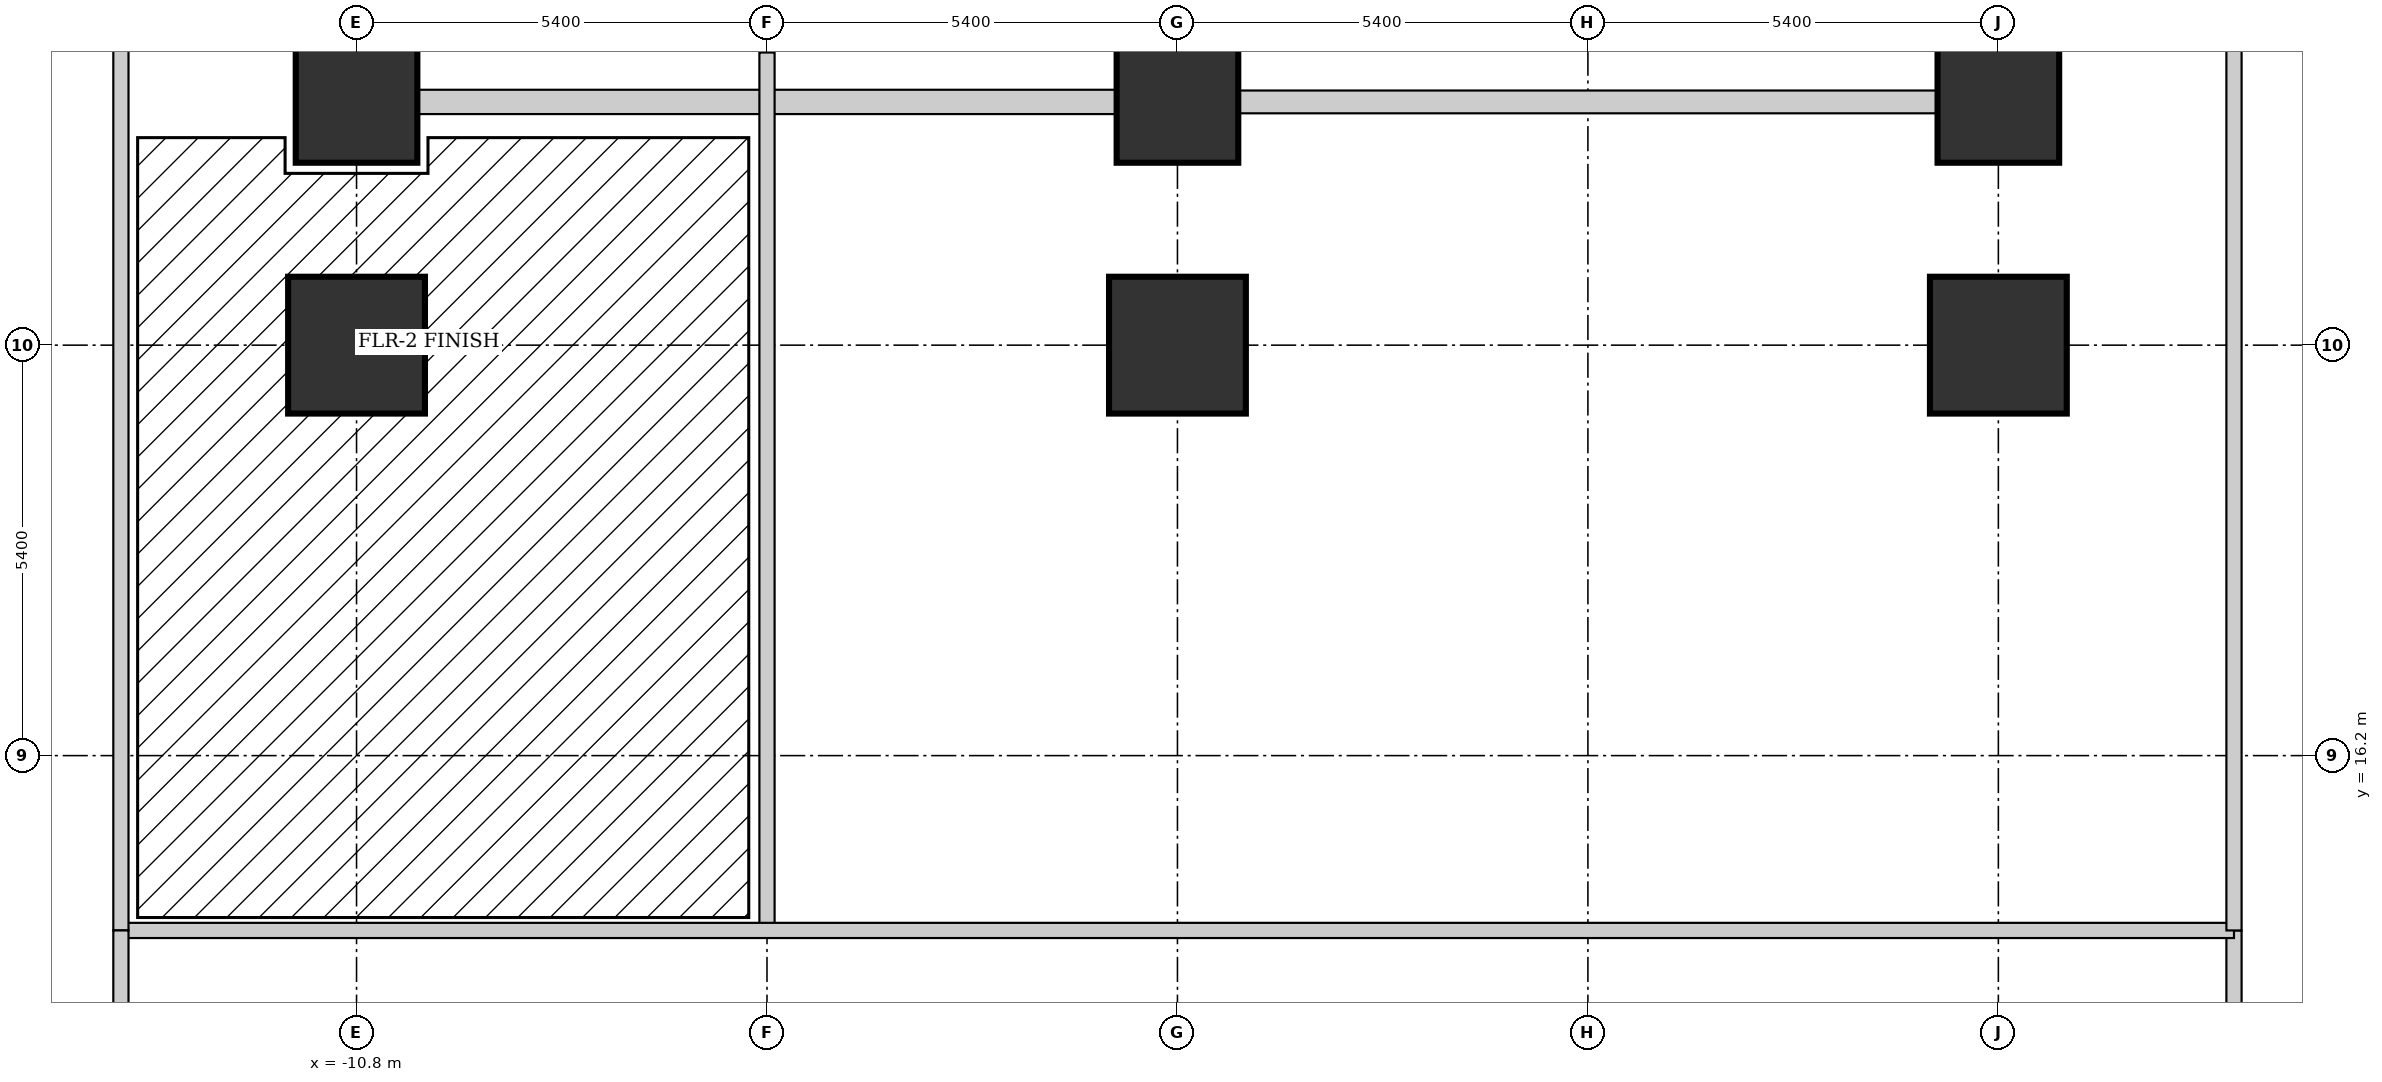
"""IFC4 building model, lengths in metres.
Left out: names, types, materials, properties, quantities, classifications, styles, units other than length and angle.
Written with IfcOpenShell. Run it as: python <this file> out.ifc"""

import sys

from ifc_helpers import new_model, si_unit, direction, frame, frame_2d, origin, origin_2d, place, context, subcontext, project, spatial, rectangle, circle, extrude, element, fill, save


model = new_model("IFC4")
c1 = context("Model", 3, precision=1e-05, world=origin(), true_north=direction((0.0, 1.0)))
c2 = subcontext(c1, "Body", "Model", "MODEL_VIEW")
j1 = project(units=[si_unit("LENGTHUNIT", "METRE"), si_unit("PLANEANGLEUNIT", "RADIAN")], contexts=[c1])
p1 = place(None, origin())
s1 = spatial("IfcSite", under=j1, at=p1, CompositionType="ELEMENT")
p2 = place(p1, origin())
s2 = spatial("IfcBuilding", under=s1, at=p2, CompositionType="ELEMENT")
p3 = place(p2, frame((0.0, 0.0, 9.0)))
s3 = spatial("IfcBuildingStorey", under=s2, at=p3, CompositionType="ELEMENT", Elevation=9.0)
p4 = place(p3, frame((-10.8, 21.6, 0.0), z_axis=(0.0, 0.0, 1.0), x_axis=(1.0, 0.0, 0.0)))
e1 = element("IfcColumn", 1, at=p4, inside=s3, PredefinedType="COLUMN", context=c2, shape_type="SweptSolid", body=[
    extrude(circle(Radius=0.9, at=origin_2d()), origin(), (0.0, 0.0, 1.0), 4.5),
])
p5 = place(p3, frame((-10.8, 24.8, 0.0), z_axis=(0.0, 0.0, 1.0), x_axis=(1.0, 0.0, 0.0)))
e2 = element("IfcColumn", 2, at=p5, inside=s3, PredefinedType="COLUMN", context=c2, shape_type="SweptSolid", body=[
    extrude(rectangle(XDim=1.6, YDim=1.6, at=origin_2d()), origin(), (0.0, 0.0, 1.0), 4.5),
])
p6 = place(p3, frame((0.0, 21.6, 0.0), z_axis=(0.0, 0.0, 1.0), x_axis=(1.0, 0.0, 0.0)))
e3 = element("IfcColumn", 3, at=p6, inside=s3, PredefinedType="COLUMN", context=c2, shape_type="SweptSolid", body=[
    extrude(circle(Radius=0.9, at=origin_2d()), origin(), (0.0, 0.0, 1.0), 4.5),
])
p7 = place(p3, frame((0.0, 24.8, 0.0), z_axis=(0.0, 0.0, 1.0), x_axis=(1.0, 0.0, 0.0)))
e4 = element("IfcColumn", 4, at=p7, inside=s3, PredefinedType="COLUMN", context=c2, shape_type="SweptSolid", body=[
    extrude(rectangle(XDim=1.6, YDim=1.6, at=origin_2d()), origin(), (0.0, 0.0, 1.0), 4.5),
])
p8 = place(p3, frame((10.8, 21.6, 0.0), z_axis=(0.0, 0.0, 1.0), x_axis=(1.0, 0.0, 0.0)))
e5 = element("IfcColumn", 5, at=p8, inside=s3, PredefinedType="COLUMN", context=c2, shape_type="SweptSolid", body=[
    extrude(circle(Radius=0.9, at=origin_2d()), origin(), (0.0, 0.0, 1.0), 4.5),
])
p9 = place(p3, frame((10.8, 24.8, 0.0), z_axis=(0.0, 0.0, 1.0), x_axis=(1.0, 0.0, 0.0)))
e6 = element("IfcColumn", 6, at=p9, inside=s3, PredefinedType="COLUMN", context=c2, shape_type="SweptSolid", body=[
    extrude(rectangle(XDim=1.6, YDim=1.6, at=origin_2d()), origin(), (0.0, 0.0, 1.0), 4.5),
])
p10 = place(p3, frame((-10.002, 24.8, 0.0), z_axis=(0.0, 0.0, 1.0), x_axis=(1.0, 0.0, 0.0)))
e7 = element("IfcWall", 7, at=p10, inside=s3, PredefinedType="STANDARD", context=c2, shape_type="SweptSolid", body=[
    extrude(rectangle(XDim=9.204, YDim=0.32, at=frame_2d((4.602, 0.0))), origin(), (0.0, 0.0, 1.0), 3.379),
])
p11 = place(p3, frame((0.798, 24.8, 0.0), z_axis=(0.0, 0.0, 1.0), x_axis=(1.0, 0.0, 0.0)))
e8 = element("IfcWall", 8, at=p11, inside=s3, PredefinedType="STANDARD", context=c2, shape_type="SweptSolid", body=[
    extrude(rectangle(XDim=9.204, YDim=0.3, at=frame_2d((4.602, 0.0))), origin(), (0.0, 0.0, 1.0), 3.379),
])
p12 = place(p11, frame((3.702, 0.0, 0.85)))
e9 = element("IfcOpeningElement", 9, at=p12, cuts=e8, PredefinedType="OPENING", context=c2, shape_type="SweptSolid", body=[
    extrude(rectangle(XDim=1.8, YDim=1.75, at=frame_2d((0.9, 0.875))), frame((0.0, 0.16, 0.0), z_axis=(0.0, -1.0, 0.0), x_axis=(1.0, 0.0, 0.0)), (0.0, 0.0, 1.0), 0.32),
])
p13 = place(p3, frame((-5.4, 13.9, 0.0), z_axis=(0.0, 0.0, 1.0), x_axis=(0.0, 1.0, 0.0)))
e10 = element("IfcWall", 10, at=p13, inside=s3, PredefinedType="PARTITIONING", context=c2, shape_type="SweptSolid", body=[
    extrude(rectangle(XDim=11.55, YDim=0.2, at=frame_2d((5.775, 0.0))), origin(), (0.0, 0.0, 1.0), 3.379),
])
p14 = place(p3, frame((13.9, -11.45, 0.0), z_axis=(0.0, 0.0, 1.0), x_axis=(0.0, 1.0, 0.0)))
e11 = element("IfcWall", 11, at=p14, inside=s3, PredefinedType="PARTITIONING", context=c2, shape_type="SweptSolid", body=[
    extrude(rectangle(XDim=25.35, YDim=0.2, at=frame_2d((12.675, 0.0))), origin(), (0.0, 0.0, 1.0), 3.379),
])
p15 = place(p14, frame((10.0, 0.0, 0.0)))
e12 = element("IfcOpeningElement", 12, at=p15, cuts=e11, PredefinedType="OPENING", context=c2, shape_type="SweptSolid", body=[
    extrude(rectangle(XDim=1.1, YDim=2.1, at=frame_2d((0.55, 1.05))), frame((0.0, 0.11, 0.0), z_axis=(0.0, -1.0, 0.0), x_axis=(1.0, 0.0, 0.0)), (0.0, 0.0, 1.0), 0.22),
])
p16 = place(p3, frame((-13.9, 13.9, 0.0), z_axis=(0.0, 0.0, 1.0), x_axis=(1.0, 0.0, 0.0)))
e13 = element("IfcWall", 13, at=p16, inside=s3, PredefinedType="PARTITIONING", context=c2, shape_type="SweptSolid", body=[
    extrude(rectangle(XDim=27.8, YDim=0.2, at=frame_2d((13.9, 0.0))), origin(), (0.0, 0.0, 1.0), 3.379),
])
p17 = place(p16, frame((3.5, 0.0, 0.0)))
e14 = element("IfcOpeningElement", 14, at=p17, cuts=e13, PredefinedType="OPENING", context=c2, shape_type="SweptSolid", body=[
    extrude(rectangle(XDim=1.1, YDim=2.1, at=frame_2d((0.55, 1.05))), frame((0.0, 0.11, 0.0), z_axis=(0.0, -1.0, 0.0), x_axis=(1.0, 0.0, 0.0)), (0.0, 0.0, 1.0), 0.22),
])
p18 = place(p16, frame((21.0, 0.0, 0.0)))
e15 = element("IfcOpeningElement", 15, at=p18, cuts=e13, PredefinedType="OPENING", context=c2, shape_type="SweptSolid", body=[
    extrude(rectangle(XDim=1.1, YDim=2.1, at=frame_2d((0.55, 1.05))), frame((0.0, 0.11, 0.0), z_axis=(0.0, -1.0, 0.0), x_axis=(1.0, 0.0, 0.0)), (0.0, 0.0, 1.0), 0.22),
])
for number, where, z_axis, x_axis in (
    (16, (13.9, 13.9, 0.0), (0.0, 0.0, 1.0), (0.0, 1.0, 0.0)),
    (17, (-13.9, 13.9, 0.0), (0.0, 0.0, 1.0), (0.0, 1.0, 0.0)),
):
    element("IfcWall", number, at=place(p3, frame(where, z_axis=z_axis, x_axis=x_axis)), inside=s3, PredefinedType="PARTITIONING", context=c2, shape_type="SweptSolid", body=[
        extrude(rectangle(XDim=11.96, YDim=0.2, at=frame_2d((5.98, 0.0))), origin(), (0.0, 0.0, 1.0), 3.379),
    ])
p19 = place(p3, frame((-13.9, -13.9, 0.0), z_axis=(0.0, 0.0, 1.0), x_axis=(0.0, 1.0, 0.0)))
e18 = element("IfcWall", 18, at=p19, inside=s3, PredefinedType="PARTITIONING", context=c2, shape_type="SweptSolid", body=[
    extrude(rectangle(XDim=27.8, YDim=0.2, at=frame_2d((13.9, 0.0))), origin(), (0.0, 0.0, 1.0), 3.379),
])
p20 = place(p19, frame((12.0, 0.0, 0.0)))
e19 = element("IfcOpeningElement", 19, at=p20, cuts=e18, PredefinedType="OPENING", context=c2, shape_type="SweptSolid", body=[
    extrude(rectangle(XDim=1.1, YDim=2.1, at=frame_2d((0.55, 1.05))), frame((0.0, 0.11, 0.0), z_axis=(0.0, -1.0, 0.0), x_axis=(1.0, 0.0, 0.0)), (0.0, 0.0, 1.0), 0.22),
])
p21 = place(p12, origin())
e20 = element("IfcWindow", 20, at=p21, inside=s3, PartitioningType="SINGLE_PANEL", PredefinedType="WINDOW", context=c2, shape_type="SweptSolid", body=[
    extrude(rectangle(XDim=1.8, YDim=1.75, at=frame_2d((0.9, 0.875))), frame((0.0, 0.03, 0.0), z_axis=(0.0, -1.0, 0.0), x_axis=(1.0, 0.0, 0.0)), (0.0, 0.0, 1.0), 0.06),
])
fill(e9, e20)
p22 = place(p17, origin())
e21 = element("IfcDoor", 21, at=p22, inside=s3, OperationType="SINGLE_SWING_RIGHT", PredefinedType="DOOR", context=c2, shape_type="SweptSolid", body=[
    extrude(rectangle(XDim=1.1, YDim=2.1, at=frame_2d((0.55, 1.05))), frame((0.0, 0.025, 0.0), z_axis=(0.0, -1.0, 0.0), x_axis=(1.0, 0.0, 0.0)), (0.0, 0.0, 1.0), 0.05),
])
fill(e14, e21)
p23 = place(p18, origin())
e22 = element("IfcDoor", 22, at=p23, inside=s3, OperationType="SINGLE_SWING_LEFT", PredefinedType="DOOR", context=c2, shape_type="SweptSolid", body=[
    extrude(rectangle(XDim=1.1, YDim=2.1, at=frame_2d((0.55, 1.05))), frame((0.0, 0.025, 0.0), z_axis=(0.0, -1.0, 0.0), x_axis=(1.0, 0.0, 0.0)), (0.0, 0.0, 1.0), 0.05),
])
fill(e15, e22)
save(model, sys.argv[1])
